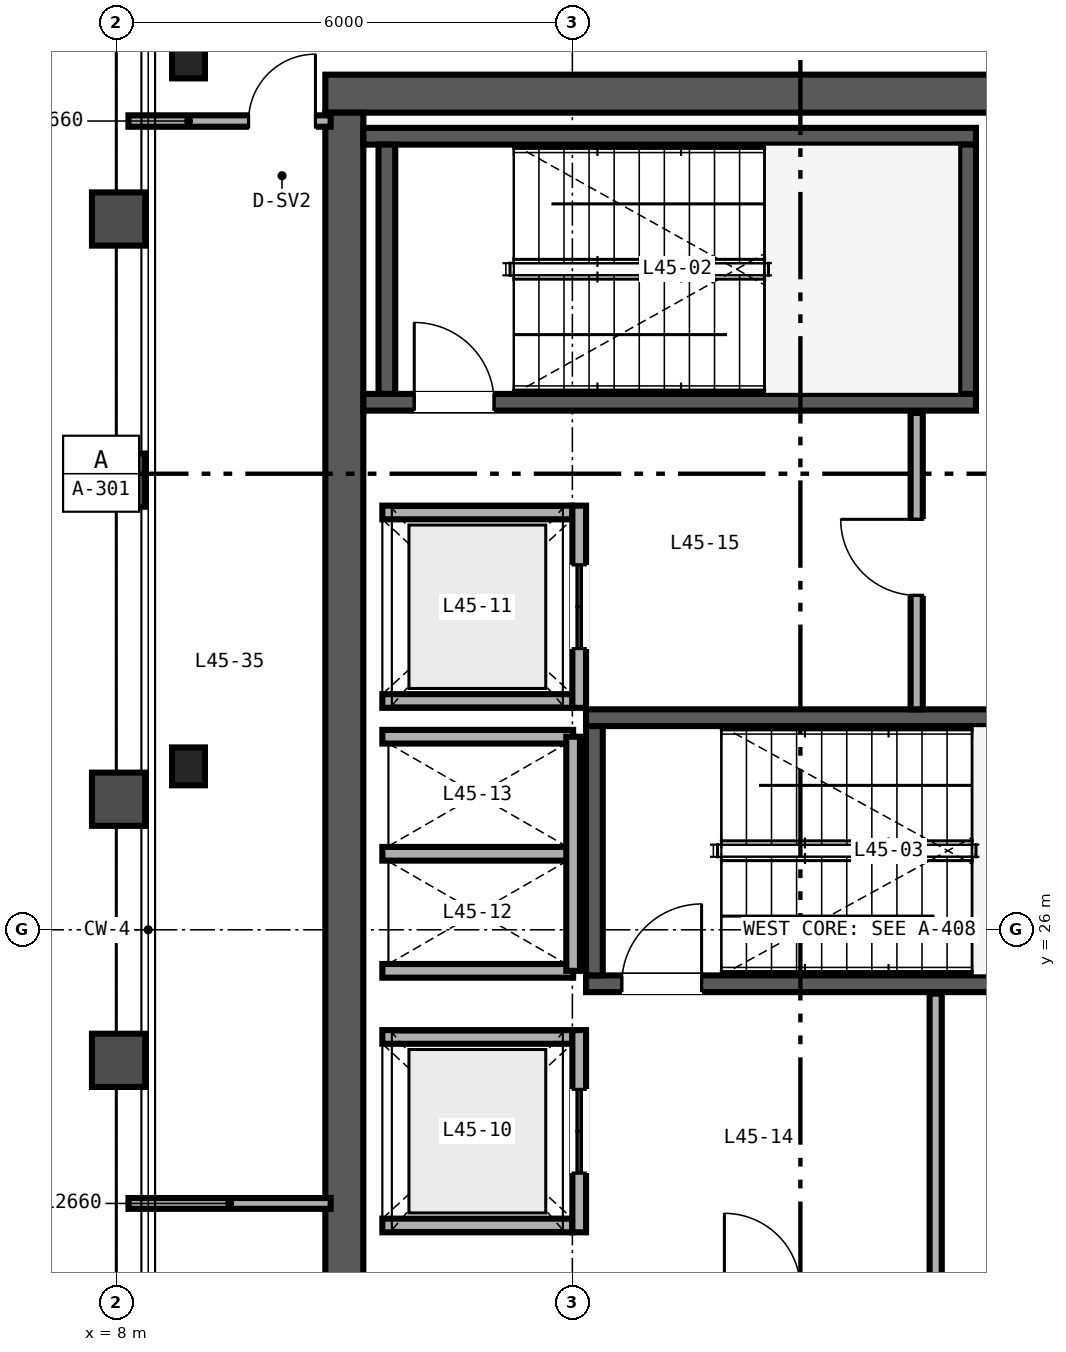
"""IFC4 building model, lengths in metres.
Left out: names, types, materials, properties, quantities, classifications, styles, units other than length and angle.
Written with IfcOpenShell. Run it as: python <this file> out.ifc"""

import sys

from ifc_helpers import new_model, si_unit, direction, frame, frame_2d, origin, origin_2d, place, context, subcontext, project, spatial, rectangle, i_section, extrude, source, transform, mapped, element, fill, save


model = new_model("IFC4")
c1 = context("Model", 3, precision=1e-05, world=origin(), true_north=direction((0.0, 1.0)))
c2 = subcontext(c1, "Body", "Model", "MODEL_VIEW")
j1 = project(units=[si_unit("LENGTHUNIT", "METRE"), si_unit("PLANEANGLEUNIT", "RADIAN")], contexts=[c1])
p1 = place(None, origin())
s1 = spatial("IfcSite", under=j1, at=p1, CompositionType="ELEMENT")
p2 = place(p1, origin())
s2 = spatial("IfcBuilding", under=s1, at=p2, CompositionType="ELEMENT")
p3 = place(p2, frame((0.0, 0.0, 181.2)))
s3 = spatial("IfcBuildingStorey", under=s2, at=p3, CompositionType="ELEMENT", Elevation=181.2)
p4 = place(p3, frame((10.75, 37.0, 0.0), z_axis=(0.0, 0.0, 1.0), x_axis=(1.0, 0.0, 0.0)))
e1 = element("IfcWall", 1, at=p4, inside=s3, PredefinedType="SHEAR", context=c2, shape_type="SweptSolid", body=[
    extrude(rectangle(XDim=12.5, YDim=0.5, at=frame_2d((6.25, 0.0))), origin(), (0.0, 0.0, 1.0), 3.37),
])
p5 = place(p4, frame((8.83, 0.0, 0.0)))
e2 = element("IfcOpeningElement", 2, at=p5, cuts=e1, PredefinedType="OPENING", context=c2, shape_type="SweptSolid", body=[
    extrude(rectangle(XDim=1.0, YDim=2.15, at=frame_2d((0.5, 1.075))), frame((0.0, 0.26, 0.0), z_axis=(0.0, -1.0, 0.0), x_axis=(1.0, 0.0, 0.0)), (0.0, 0.0, 1.0), 0.52),
])
p6 = place(p3, frame((11.0, 15.25, 0.0), z_axis=(0.0, 0.0, 1.0), x_axis=(0.0, 1.0, 0.0)))
e3 = element("IfcWall", 3, at=p6, inside=s3, PredefinedType="SHEAR", context=c2, shape_type="SweptSolid", body=[
    extrude(rectangle(XDim=21.5, YDim=0.5, at=frame_2d((10.75, 0.0))), origin(), (0.0, 0.0, 1.0), 3.37),
])
p7 = place(p3, frame((11.25, 32.94, 0.0), z_axis=(0.0, 0.0, 1.0), x_axis=(1.0, 0.0, 0.0)))
e4 = element("IfcWall", 4, at=p7, inside=s3, PredefinedType="SHEAR", context=c2, shape_type="SweptSolid", body=[
    extrude(rectangle(XDim=8.06, YDim=0.22, at=frame_2d((4.03, 0.0))), origin(), (0.0, 0.0, 1.0), 3.4),
])
p8 = place(p7, frame((0.67, 0.0, 0.0)))
e5 = element("IfcOpeningElement", 5, at=p8, cuts=e4, PredefinedType="OPENING", context=c2, shape_type="SweptSolid", body=[
    extrude(rectangle(XDim=1.05, YDim=2.15, at=frame_2d((0.525, 1.075))), frame((0.0, 0.12, 0.0), z_axis=(0.0, -1.0, 0.0), x_axis=(1.0, 0.0, 0.0)), (0.0, 0.0, 1.0), 0.24),
])
p9 = place(p3, frame((11.25, 36.44, 0.0), z_axis=(0.0, 0.0, 1.0), x_axis=(1.0, 0.0, 0.0)))
e6 = element("IfcWall", 6, at=p9, inside=s3, PredefinedType="SHEAR", context=c2, shape_type="SweptSolid", body=[
    extrude(rectangle(XDim=8.06, YDim=0.22, at=frame_2d((4.03, 0.0))), origin(), (0.0, 0.0, 1.0), 3.4),
])
for number, where, z_axis, x_axis in (
    (7, (11.56, 33.05, 0.0), (0.0, 0.0, 1.0), (0.0, 1.0, 0.0)),
    (8, (19.2, 33.05, 0.0), (0.0, 0.0, 1.0), (0.0, 1.0, 0.0)),
):
    element("IfcWall", number, at=place(p3, frame(where, z_axis=z_axis, x_axis=x_axis)), inside=s3, PredefinedType="SHEAR", context=c2, shape_type="SweptSolid", body=[
        extrude(rectangle(XDim=3.28, YDim=0.22, at=frame_2d((1.64, 0.0))), origin(), (0.0, 0.0, 1.0), 3.4),
    ])
p10 = place(p3, frame((14.18, 25.29, 0.0), z_axis=(0.0, 0.0, 1.0), x_axis=(1.0, 0.0, 0.0)))
e9 = element("IfcWall", 9, at=p10, inside=s3, PredefinedType="SHEAR", context=c2, shape_type="SweptSolid", body=[
    extrude(rectangle(XDim=8.57, YDim=0.22, at=frame_2d((4.285, 0.0))), origin(), (0.0, 0.0, 1.0), 3.4),
])
p11 = place(p10, frame((0.47, 0.0, 0.0)))
e10 = element("IfcOpeningElement", 10, at=p11, cuts=e9, PredefinedType="OPENING", context=c2, shape_type="SweptSolid", body=[
    extrude(rectangle(XDim=1.05, YDim=2.15, at=frame_2d((0.525, 1.075))), frame((0.0, 0.12, 0.0), z_axis=(0.0, -1.0, 0.0), x_axis=(1.0, 0.0, 0.0)), (0.0, 0.0, 1.0), 0.24),
])
p12 = place(p3, frame((14.18, 28.79, 0.0), z_axis=(0.0, 0.0, 1.0), x_axis=(1.0, 0.0, 0.0)))
e11 = element("IfcWall", 11, at=p12, inside=s3, PredefinedType="SHEAR", context=c2, shape_type="SweptSolid", body=[
    extrude(rectangle(XDim=8.57, YDim=0.22, at=frame_2d((4.285, 0.0))), origin(), (0.0, 0.0, 1.0), 3.4),
])
p13 = place(p3, frame((14.29, 25.4, 0.0), z_axis=(0.0, 0.0, 1.0), x_axis=(0.0, 1.0, 0.0)))
e12 = element("IfcWall", 12, at=p13, inside=s3, PredefinedType="SHEAR", context=c2, shape_type="SweptSolid", body=[
    extrude(rectangle(XDim=3.28, YDim=0.22, at=frame_2d((1.64, 0.0))), origin(), (0.0, 0.0, 1.0), 3.4),
])
m1 = source(origin(), c2, "Body", "SweptSolid", [
    extrude(i_section(OverallWidth=0.432, OverallDepth=0.498, WebThickness=0.056, FlangeThickness=0.089, FilletRadius=0.025, at=origin_2d()), origin(), (0.0, 0.0, 1.0), 3.37),
])
for number, where, z_axis, x_axis in (
    (13, (8.95, 28.15, 0.0), (0.0, 0.0, 1.0), (1.0, 0.0, 0.0)),
    (14, (8.95, 37.45, 0.0), (0.0, 0.0, 1.0), (1.0, 0.0, 0.0)),
):
    element("IfcColumn", number, at=place(p3, frame(where, z_axis=z_axis, x_axis=x_axis)), inside=s3, PredefinedType="COLUMN", context=c2, shape_type="MappedRepresentation", body=[
        mapped(m1, transform((0.0, 0.0, 0.0), scale=1.0)),
    ])
for number, where, z_axis, x_axis in (
    (15, (11.5, 22.11, 0.0), (0.0, 0.0, 1.0), (1.0, 0.0, 0.0)),
    (16, (11.5, 24.59, 0.0), (0.0, 0.0, 1.0), (1.0, 0.0, 0.0)),
):
    element("IfcWall", number, at=place(p3, frame(where, z_axis=z_axis, x_axis=x_axis)), inside=s3, PredefinedType="SOLIDWALL", context=c2, shape_type="SweptSolid", body=[
        extrude(rectangle(XDim=2.5, YDim=0.18, at=frame_2d((1.25, 0.0))), origin(), (0.0, 0.0, 1.0), 3.37),
    ])
p14 = place(p3, frame((14.09, 22.02, 0.0), z_axis=(0.0, 0.0, 1.0), x_axis=(0.0, 1.0, 0.0)))
e17 = element("IfcWall", 17, at=p14, inside=s3, PredefinedType="SOLIDWALL", context=c2, shape_type="SweptSolid", body=[
    extrude(rectangle(XDim=2.66, YDim=0.18, at=frame_2d((1.33, 0.0))), origin(), (0.0, 0.0, 1.0), 3.37),
])
p15 = place(p14, frame((0.78, 0.0, 0.0)))
e18 = element("IfcOpeningElement", 18, at=p15, cuts=e17, PredefinedType="OPENING", context=c2, shape_type="SweptSolid", body=[
    extrude(rectangle(XDim=1.1, YDim=2.2, at=frame_2d((0.55, 1.1))), frame((0.0, 0.1, 0.0), z_axis=(0.0, -1.0, 0.0), x_axis=(1.0, 0.0, 0.0)), (0.0, 0.0, 1.0), 0.2),
])
for number, where, z_axis, x_axis in (
    (19, (11.5, 29.01, 0.0), (0.0, 0.0, 1.0), (1.0, 0.0, 0.0)),
    (20, (11.5, 31.49, 0.0), (0.0, 0.0, 1.0), (1.0, 0.0, 0.0)),
):
    element("IfcWall", number, at=place(p3, frame(where, z_axis=z_axis, x_axis=x_axis)), inside=s3, PredefinedType="SOLIDWALL", context=c2, shape_type="SweptSolid", body=[
        extrude(rectangle(XDim=2.5, YDim=0.18, at=frame_2d((1.25, 0.0))), origin(), (0.0, 0.0, 1.0), 3.37),
    ])
p16 = place(p3, frame((14.09, 28.92, 0.0), z_axis=(0.0, 0.0, 1.0), x_axis=(0.0, 1.0, 0.0)))
e21 = element("IfcWall", 21, at=p16, inside=s3, PredefinedType="SOLIDWALL", context=c2, shape_type="SweptSolid", body=[
    extrude(rectangle(XDim=2.66, YDim=0.18, at=frame_2d((1.33, 0.0))), origin(), (0.0, 0.0, 1.0), 3.37),
])
p17 = place(p16, frame((0.78, 0.0, 0.0)))
e22 = element("IfcOpeningElement", 22, at=p17, cuts=e21, PredefinedType="OPENING", context=c2, shape_type="SweptSolid", body=[
    extrude(rectangle(XDim=1.1, YDim=2.2, at=frame_2d((0.55, 1.1))), frame((0.0, 0.1, 0.0), z_axis=(0.0, -1.0, 0.0), x_axis=(1.0, 0.0, 0.0)), (0.0, 0.0, 1.0), 0.2),
])
for number, where, z_axis, x_axis in (
    (23, (11.5, 25.46, 0.0), (0.0, 0.0, 1.0), (1.0, 0.0, 0.0)),
    (24, (11.5, 27.0, 0.0), (0.0, 0.0, 1.0), (1.0, 0.0, 0.0)),
    (25, (11.5, 28.54, 0.0), (0.0, 0.0, 1.0), (1.0, 0.0, 0.0)),
):
    element("IfcWall", number, at=place(p3, frame(where, z_axis=z_axis, x_axis=x_axis)), inside=s3, PredefinedType="SOLIDWALL", context=c2, shape_type="SweptSolid", body=[
        extrude(rectangle(XDim=2.51, YDim=0.18, at=frame_2d((1.255, 0.0))), origin(), (0.0, 0.0, 1.0), 3.37),
    ])
p18 = place(p3, frame((14.01, 25.46, 0.0), z_axis=(0.0, 0.0, 1.0), x_axis=(0.0, 1.0, 0.0)))
e26 = element("IfcWall", 26, at=p18, inside=s3, PredefinedType="SOLIDWALL", context=c2, shape_type="SweptSolid", body=[
    extrude(rectangle(XDim=3.08, YDim=0.18, at=frame_2d((1.54, 0.0))), origin(), (0.0, 0.0, 1.0), 3.37),
])
p19 = place(p3, frame((18.78, 21.35, 0.0), z_axis=(0.0, 0.0, 1.0), x_axis=(0.0, 1.0, 0.0)))
e27 = element("IfcWall", 27, at=p19, inside=s3, PredefinedType="PARTITIONING", context=c2, shape_type="SweptSolid", body=[
    extrude(rectangle(XDim=3.81, YDim=0.16, at=frame_2d((1.905, 0.0))), origin(), (0.0, 0.0, 1.0), 3.37),
])
p20 = place(p3, frame((18.53, 28.9, 0.0), z_axis=(0.0, 0.0, 1.0), x_axis=(0.0, 1.0, 0.0)))
e28 = element("IfcWall", 28, at=p20, inside=s3, PredefinedType="PARTITIONING", context=c2, shape_type="SweptSolid", body=[
    extrude(rectangle(XDim=3.9, YDim=0.16, at=frame_2d((1.95, 0.0))), origin(), (0.0, 0.0, 1.0), 3.37),
])
p21 = place(p20, frame((1.5, 0.0, 0.0)))
e29 = element("IfcOpeningElement", 29, at=p21, cuts=e28, PredefinedType="OPENING", context=c2, shape_type="SweptSolid", body=[
    extrude(rectangle(XDim=1.0, YDim=2.15, at=frame_2d((0.5, 1.075))), frame((0.0, 0.09, 0.0), z_axis=(0.0, -1.0, 0.0), x_axis=(1.0, 0.0, 0.0)), (0.0, 0.0, 1.0), 0.18),
])
p22 = place(p3, frame((8.16, 36.64, 0.0), z_axis=(0.0, 0.0, 1.0), x_axis=(1.0, 0.0, 0.0)))
e30 = element("IfcWall", 30, at=p22, inside=s3, PredefinedType="PARTITIONING", context=c2, shape_type="SweptSolid", body=[
    extrude(rectangle(XDim=2.66, YDim=0.15, at=frame_2d((1.33, 0.0))), origin(), (0.0, 0.0, 1.0), 2.753),
])
p23 = place(p22, frame((1.58, 0.0, 0.0)))
e31 = element("IfcOpeningElement", 31, at=p23, cuts=e30, PredefinedType="OPENING", context=c2, shape_type="SweptSolid", body=[
    extrude(rectangle(XDim=0.88, YDim=2.15, at=frame_2d((0.44, 1.075))), frame((0.0, 0.085, 0.0), z_axis=(0.0, -1.0, 0.0), x_axis=(1.0, 0.0, 0.0)), (0.0, 0.0, 1.0), 0.17),
])
p24 = place(p3, frame((8.16, 22.4, 0.0), z_axis=(0.0, 0.0, 1.0), x_axis=(1.0, 0.0, 0.0)))
e32 = element("IfcWall", 32, at=p24, inside=s3, PredefinedType="PARTITIONING", context=c2, shape_type="SweptSolid", body=[
    extrude(rectangle(XDim=2.66, YDim=0.142, at=frame_2d((1.33, 0.0))), origin(), (0.0, 0.0, 1.0), 2.591),
])
m2 = source(origin(), c2, "Body", "SweptSolid", [
    extrude(rectangle(XDim=1.05, YDim=2.15, at=frame_2d((0.525, 1.075))), frame((0.0, 0.025, 0.0), z_axis=(0.0, -1.0, 0.0), x_axis=(1.0, 0.0, 0.0)), (0.0, 0.0, 1.0), 0.05),
])
p25 = place(p8, origin())
e33 = element("IfcDoor", 33, at=p25, inside=s3, OperationType="SINGLE_SWING_LEFT", PredefinedType="DOOR", context=c2, shape_type="MappedRepresentation", body=[
    mapped(m2, transform((0.0, 0.0, 0.0), scale=1.0)),
])
fill(e5, e33)
p26 = place(p11, origin())
e34 = element("IfcDoor", 34, at=p26, inside=s3, OperationType="SINGLE_SWING_RIGHT", PredefinedType="DOOR", context=c2, shape_type="MappedRepresentation", body=[
    mapped(m2, transform((0.0, 0.0, 0.0), scale=1.0)),
])
fill(e10, e34)
m3 = source(origin(), c2, "Body", "SweptSolid", [
    extrude(rectangle(XDim=1.1, YDim=2.2, at=frame_2d((0.55, 1.1))), frame((0.0, 0.025, 0.0), z_axis=(0.0, -1.0, 0.0), x_axis=(1.0, 0.0, 0.0)), (0.0, 0.0, 1.0), 0.05),
])
p27 = place(p15, origin())
e35 = element("IfcDoor", 35, at=p27, inside=s3, OperationType="DOUBLE_DOOR_SLIDING", PredefinedType="DOOR", context=c2, shape_type="MappedRepresentation", body=[
    mapped(m3, transform((0.0, 0.0, 0.0), scale=1.0)),
])
fill(e18, e35)
p28 = place(p17, origin())
e36 = element("IfcDoor", 36, at=p28, inside=s3, OperationType="DOUBLE_DOOR_SLIDING", PredefinedType="DOOR", context=c2, shape_type="MappedRepresentation", body=[
    mapped(m3, transform((0.0, 0.0, 0.0), scale=1.0)),
])
fill(e22, e36)
m4 = source(origin(), c2, "Body", "SweptSolid", [
    extrude(rectangle(XDim=1.0, YDim=2.15, at=frame_2d((0.5, 1.075))), frame((0.0, 0.025, 0.0), z_axis=(0.0, -1.0, 0.0), x_axis=(1.0, 0.0, 0.0)), (0.0, 0.0, 1.0), 0.05),
])
p29 = place(p21, origin())
e37 = element("IfcDoor", 37, at=p29, inside=s3, OperationType="SINGLE_SWING_RIGHT", PredefinedType="DOOR", context=c2, shape_type="MappedRepresentation", body=[
    mapped(m4, transform((0.0, 0.0, 0.0), scale=1.0)),
])
fill(e29, e37)
m5 = source(origin(), c2, "Body", "SweptSolid", [
    extrude(rectangle(XDim=0.88, YDim=2.15, at=frame_2d((0.44, 1.075))), frame((0.0, 0.025, 0.0), z_axis=(0.0, -1.0, 0.0), x_axis=(1.0, 0.0, 0.0)), (0.0, 0.0, 1.0), 0.05),
])
p30 = place(p23, origin())
e38 = element("IfcDoor", 38, at=p30, inside=s3, OperationType="SINGLE_SWING_RIGHT", PredefinedType="DOOR", context=c2, shape_type="MappedRepresentation", body=[
    mapped(m5, transform((0.0, 0.0, 0.0), scale=1.0)),
])
fill(e31, e38)
save(model, sys.argv[1])
